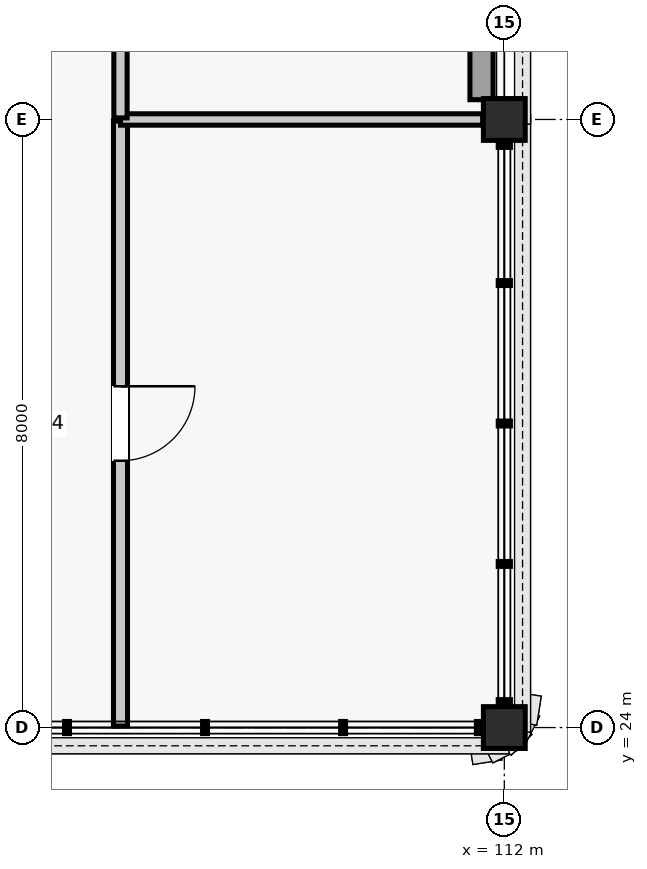
"""IFC4 building model, lengths in metres.
Left out: names, types, materials, properties, quantities, classifications, styles, units other than length and angle.
Written with IfcOpenShell. Run it as: python <this file> out.ifc"""

import sys

from ifc_helpers import new_model, si_unit, direction, frame, frame_2d, origin, origin_2d, place, context, subcontext, project, spatial, rectangle, extrude, element, fill, save


model = new_model("IFC4")
c1 = context("Model", 3, precision=1e-05, world=origin(), true_north=direction((0.0, 1.0)))
c2 = subcontext(c1, "Body", "Model", "MODEL_VIEW")
j1 = project(units=[si_unit("LENGTHUNIT", "METRE"), si_unit("PLANEANGLEUNIT", "RADIAN")], contexts=[c1])
p1 = place(None, origin())
s1 = spatial("IfcSite", under=j1, at=p1, CompositionType="ELEMENT")
p2 = place(p1, origin())
s2 = spatial("IfcBuilding", under=s1, at=p2, CompositionType="ELEMENT")
p3 = place(p2, frame((0.0, 0.0, 13.86)))
s3 = spatial("IfcBuildingStorey", under=s2, at=p3, CompositionType="ELEMENT", Elevation=13.86)
for number, where, z_axis, x_axis in (
    (1, (112.0, 24.0, 0.0), (0.0, 0.0, 1.0), (1.0, 0.0, 0.0)),
    (2, (112.0, 32.0, 0.0), (0.0, 0.0, 1.0), (1.0, 0.0, 0.0)),
):
    element("IfcColumn", number, at=place(p3, frame(where, z_axis=z_axis, x_axis=x_axis)), inside=s3, PredefinedType="COLUMN", context=c2, shape_type="SweptSolid", body=[
        extrude(rectangle(XDim=0.55, YDim=0.55, at=origin_2d()), origin(), (0.0, 0.0, 1.0), 3.96),
    ])
p4 = place(p3, frame((111.7, 32.26, 0.0), z_axis=(0.0, 0.0, 1.0), x_axis=(0.0, 1.0, 0.0)))
e3 = element("IfcWall", 3, at=p4, inside=s3, PredefinedType="SOLIDWALL", context=c2, shape_type="SweptSolid", body=[
    extrude(rectangle(XDim=7.48, YDim=0.305, at=frame_2d((3.74, 0.0))), origin(), (0.0, 0.0, 1.0), 3.364),
])
p5 = place(p3, frame((106.95, 24.02, 0.0), z_axis=(0.0, 0.0, 1.0), x_axis=(0.0, 1.0, 0.0)))
e4 = element("IfcWall", 4, at=p5, inside=s3, PredefinedType="PARTITIONING", context=c2, shape_type="SweptSolid", body=[
    extrude(rectangle(XDim=7.96, YDim=0.185, at=frame_2d((3.98, 0.0))), origin(), (0.0, 0.0, 1.0), 3.253),
])
p6 = place(p5, frame((3.49, 0.0, 0.0)))
e5 = element("IfcOpeningElement", 5, at=p6, cuts=e4, PredefinedType="OPENING", context=c2, shape_type="SweptSolid", body=[
    extrude(rectangle(XDim=0.98, YDim=2.15, at=frame_2d((0.49, 1.075))), frame((0.0, 0.103, 0.0), z_axis=(0.0, -1.0, 0.0), x_axis=(1.0, 0.0, 0.0)), (0.0, 0.0, 1.0), 0.205),
])
p7 = place(p3, frame((106.95, 32.0, 0.0), z_axis=(0.0, 0.0, 1.0), x_axis=(1.0, 0.0, 0.0)))
e6 = element("IfcWall", 6, at=p7, inside=s3, PredefinedType="PARTITIONING", context=c2, shape_type="SweptSolid", body=[
    extrude(rectangle(XDim=4.765, YDim=0.15, at=frame_2d((2.383, 0.0))), origin(), (0.0, 0.0, 1.0), 3.253),
])
p8 = place(p3, frame((106.95, 32.02, 0.0), z_axis=(0.0, 0.0, 1.0), x_axis=(0.0, 1.0, 0.0)))
e7 = element("IfcWall", 7, at=p8, inside=s3, PredefinedType="PARTITIONING", context=c2, shape_type="SweptSolid", body=[
    extrude(rectangle(XDim=7.96, YDim=0.175, at=frame_2d((3.98, 0.0))), origin(), (0.0, 0.0, 1.0), 3.241),
])
p9 = place(p8, frame((3.47, 0.0, 0.0)))
e8 = element("IfcOpeningElement", 8, at=p9, cuts=e7, PredefinedType="OPENING", context=c2, shape_type="SweptSolid", body=[
    extrude(rectangle(XDim=1.02, YDim=2.2, at=frame_2d((0.51, 1.1))), frame((0.0, 0.097, 0.0), z_axis=(0.0, -1.0, 0.0), x_axis=(1.0, 0.0, 0.0)), (0.0, 0.0, 1.0), 0.195),
])
p10 = place(p6, frame((0.98, 0.0, 0.0), z_axis=(0.0, 0.0, 1.0), x_axis=(-1.0, 0.0, 0.0)))
e9 = element("IfcDoor", 9, at=p10, inside=s3, OperationType="SINGLE_SWING_RIGHT", PredefinedType="DOOR", context=c2, shape_type="SweptSolid", body=[
    extrude(rectangle(XDim=0.98, YDim=2.15, at=frame_2d((0.49, 1.075))), frame((0.0, 0.025, 0.0), z_axis=(0.0, -1.0, 0.0), x_axis=(1.0, 0.0, 0.0)), (0.0, 0.0, 1.0), 0.05),
])
fill(e5, e9)
save(model, sys.argv[1])
